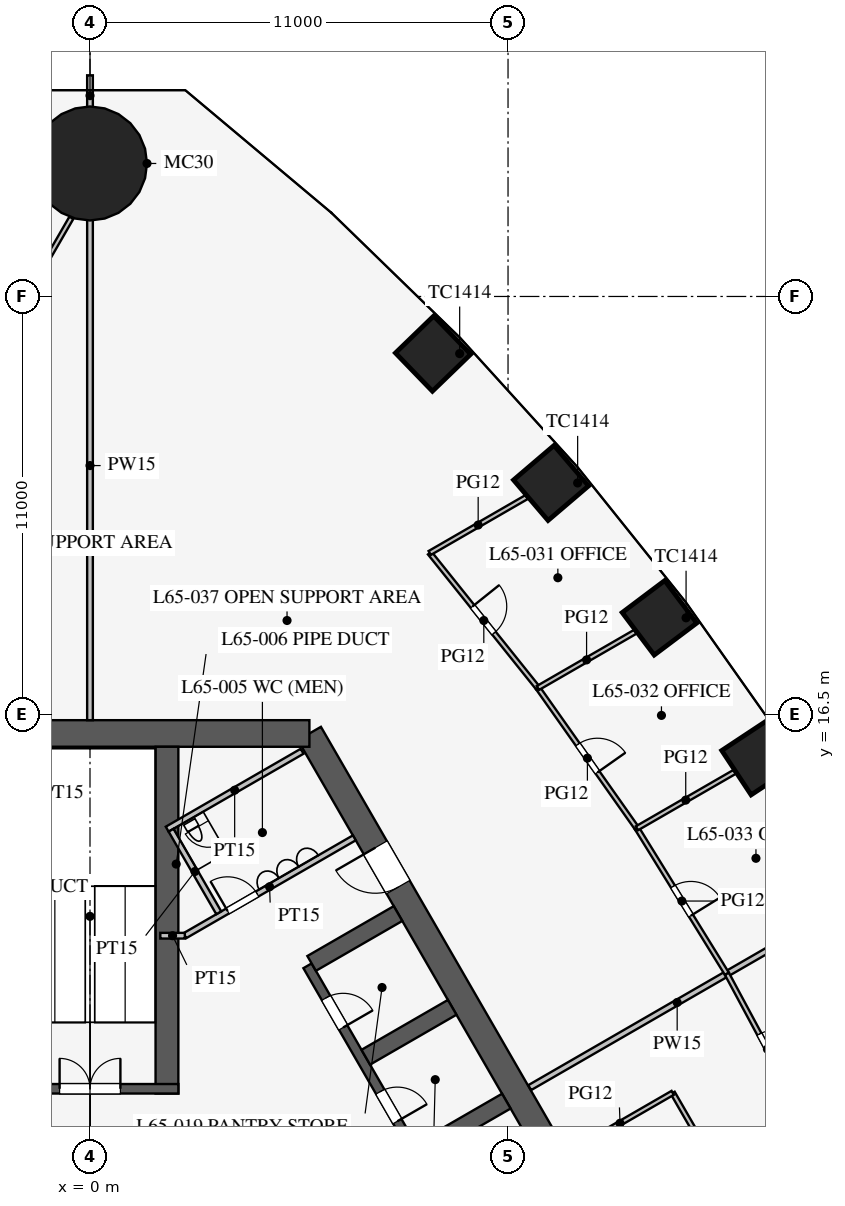
"""IFC4 building model, lengths in metres.
Left out: names, types, materials, properties, quantities, classifications, styles, units other than length and angle.
Written with IfcOpenShell. Run it as: python <this file> out.ifc"""

import sys

from ifc_helpers import new_model, si_unit, direction, frame, frame_2d, origin, origin_2d, place, context, subcontext, project, spatial, rectangle, circle, extrude, element, fill, save


model = new_model("IFC4")
c1 = context("Model", 3, precision=1e-05, world=origin(), true_north=direction((0.0, 1.0)))
c2 = subcontext(c1, "Body", "Model", "MODEL_VIEW")
j1 = project(units=[si_unit("LENGTHUNIT", "METRE"), si_unit("PLANEANGLEUNIT", "RADIAN")], contexts=[c1])
p1 = place(None, origin())
s1 = spatial("IfcSite", under=j1, at=p1, CompositionType="ELEMENT")
p2 = place(p1, origin())
s2 = spatial("IfcBuilding", under=s1, at=p2, CompositionType="ELEMENT")
p3 = place(p2, frame((0.0, 0.0, 284.7)))
s3 = spatial("IfcBuildingStorey", under=s2, at=p3, CompositionType="ELEMENT", Elevation=284.7)
for number, where, z_axis, x_axis in (
    (1, (17.594, 15.354, 0.0), (0.0, 0.0, 1.0), (-0.552, 0.834, 0.0)),
    (2, (14.985, 19.044, 0.0), (0.0, 0.0, 1.0), (-0.601, 0.799, 0.0)),
    (3, (12.132, 22.593, 0.0), (0.0, 0.0, 1.0), (-0.649, 0.761, 0.0)),
    (4, (9.027, 25.997, 0.0), (0.0, 0.0, 1.0), (-0.695, 0.719, 0.0)),
):
    element("IfcColumn", number, at=place(p3, frame(where, z_axis=z_axis, x_axis=x_axis)), inside=s3, PredefinedType="COLUMN", context=c2, shape_type="SweptSolid", body=[
        extrude(rectangle(XDim=1.4, YDim=1.4, at=origin_2d()), origin(), (0.0, 0.0, 1.0), 4.2),
    ])
p4 = place(p3, frame((0.0, 31.0, 0.0), z_axis=(0.0, 0.0, 1.0), x_axis=(1.0, 0.0, 0.0)))
e5 = element("IfcColumn", 5, at=p4, inside=s3, PredefinedType="COLUMN", context=c2, shape_type="SweptSolid", body=[
    extrude(circle(Radius=1.5, at=origin_2d()), origin(), (0.0, 0.0, 1.0), 4.2),
])
p5 = place(p3, frame((16.743, -3.0, 0.0), z_axis=(0.0, 0.0, 1.0), x_axis=(-0.500002442456, 0.866023993627, 0.0)))
e6 = element("IfcWall", 6, at=p5, inside=s3, PredefinedType="SHEAR", context=c2, shape_type="SweptSolid", body=[
    extrude(rectangle(XDim=21.939, YDim=0.7, at=frame_2d((10.97, 0.0))), origin(), (0.0, 0.0, 1.0), 4.2),
])
p6 = place(p5, frame((17.27, 0.0, 0.0)))
e7 = element("IfcOpeningElement", 7, at=p6, cuts=e6, PredefinedType="OPENING", context=c2, shape_type="SweptSolid", body=[
    extrude(rectangle(XDim=1.2, YDim=2.1, at=frame_2d((0.6, 1.05))), frame((0.0, 0.36, 0.0), z_axis=(0.0, -1.0, 0.0), x_axis=(1.0, 0.0, 0.0)), (0.0, 0.0, 1.0), 0.72),
])
p7 = place(p5, frame((3.47, 0.0, 0.0)))
e8 = element("IfcOpeningElement", 8, at=p7, cuts=e6, PredefinedType="OPENING", context=c2, shape_type="SweptSolid", body=[
    extrude(rectangle(XDim=1.2, YDim=2.1, at=frame_2d((0.6, 1.05))), frame((0.0, 0.36, 0.0), z_axis=(0.0, -1.0, 0.0), x_axis=(1.0, 0.0, 0.0)), (0.0, 0.0, 1.0), 0.72),
])
p8 = place(p3, frame((5.773, 16.0, 0.0), z_axis=(0.0, 0.0, 1.0), x_axis=(-1.0, 0.0, 0.0)))
e9 = element("IfcWall", 9, at=p8, inside=s3, PredefinedType="SHEAR", context=c2, shape_type="SweptSolid", body=[
    extrude(rectangle(XDim=11.547, YDim=0.7, at=frame_2d((5.773, 0.0))), origin(), (0.0, 0.0, 1.0), 4.2),
])
p9 = place(p3, frame((11.424, 0.014, 0.0), z_axis=(0.0, 0.0, 1.0), x_axis=(-0.500001763848, 0.866024385424, 0.0)))
e10 = element("IfcWall", 10, at=p9, inside=s3, PredefinedType="SHEAR", context=c2, shape_type="SweptSolid", body=[
    extrude(rectangle(XDim=11.4, YDim=0.25, at=frame_2d((5.7, 0.0))), origin(), (0.0, 0.0, 1.0), 4.2),
])
p10 = place(p9, frame((0.975, 0.0, 0.0)))
e11 = element("IfcOpeningElement", 11, at=p10, cuts=e10, PredefinedType="OPENING", context=c2, shape_type="SweptSolid", body=[
    extrude(rectangle(XDim=0.9, YDim=2.1, at=frame_2d((0.45, 1.05))), frame((0.0, 0.135, 0.0), z_axis=(0.0, -1.0, 0.0), x_axis=(1.0, 0.0, 0.0)), (0.0, 0.0, 1.0), 0.27),
])
p11 = place(p9, frame((3.825, 0.0, 0.0)))
e12 = element("IfcOpeningElement", 12, at=p11, cuts=e10, PredefinedType="OPENING", context=c2, shape_type="SweptSolid", body=[
    extrude(rectangle(XDim=0.9, YDim=2.1, at=frame_2d((0.45, 1.05))), frame((0.0, 0.135, 0.0), z_axis=(0.0, -1.0, 0.0), x_axis=(1.0, 0.0, 0.0)), (0.0, 0.0, 1.0), 0.27),
])
p12 = place(p9, frame((6.675, 0.0, 0.0)))
e13 = element("IfcOpeningElement", 13, at=p12, cuts=e10, PredefinedType="OPENING", context=c2, shape_type="SweptSolid", body=[
    extrude(rectangle(XDim=0.9, YDim=2.1, at=frame_2d((0.45, 1.05))), frame((0.0, 0.135, 0.0), z_axis=(0.0, -1.0, 0.0), x_axis=(1.0, 0.0, 0.0)), (0.0, 0.0, 1.0), 0.27),
])
p13 = place(p9, frame((9.525, 0.0, 0.0)))
e14 = element("IfcOpeningElement", 14, at=p13, cuts=e10, PredefinedType="OPENING", context=c2, shape_type="SweptSolid", body=[
    extrude(rectangle(XDim=0.9, YDim=2.1, at=frame_2d((0.45, 1.05))), frame((0.0, 0.135, 0.0), z_axis=(0.0, -1.0, 0.0), x_axis=(1.0, 0.0, 0.0)), (0.0, 0.0, 1.0), 0.27),
])
for number, where, z_axis, x_axis in (
    (15, (8.682, 5.012, 0.0), (0.0, 0.0, 1.0), (0.866, 0.5, 0.0)),
    (16, (7.257, 7.481, 0.0), (0.0, 0.0, 1.0), (0.866, 0.5, 0.0)),
    (17, (5.832, 9.949, 0.0), (0.0, 0.0, 1.0), (0.866, 0.5, 0.0)),
):
    element("IfcWall", number, at=place(p3, frame(where, z_axis=z_axis, x_axis=x_axis)), inside=s3, PredefinedType="SHEAR", context=c2, shape_type="SweptSolid", body=[
        extrude(rectangle(XDim=2.625, YDim=0.45, at=frame_2d((1.312, 0.0))), origin(), (0.0, 0.0, 1.0), 4.2),
    ])
p14 = place(p3, frame((2.025, 6.525, 0.0), z_axis=(0.0, 0.0, 1.0), x_axis=(0.0, 1.0, 0.0)))
e18 = element("IfcWall", 18, at=p14, inside=s3, PredefinedType="SHEAR", context=c2, shape_type="SweptSolid", body=[
    extrude(rectangle(XDim=9.125, YDim=0.6, at=frame_2d((4.562, 0.0))), origin(), (0.0, 0.0, 1.0), 4.2),
])
p15 = place(p3, frame((2.325, 6.65, 0.0), z_axis=(0.0, 0.0, 1.0), x_axis=(-1.0, 0.0, 0.0)))
e19 = element("IfcWall", 19, at=p15, inside=s3, PredefinedType="SHEAR", context=c2, shape_type="SweptSolid", body=[
    extrude(rectangle(XDim=4.65, YDim=0.25, at=frame_2d((2.325, 0.0))), origin(), (0.0, 0.0, 1.0), 4.2),
])
p16 = place(p15, frame((1.525, 0.0, 0.0)))
e20 = element("IfcOpeningElement", 20, at=p16, cuts=e19, PredefinedType="OPENING", context=c2, shape_type="SweptSolid", body=[
    extrude(rectangle(XDim=1.6, YDim=2.1, at=frame_2d((0.8, 1.05))), frame((0.0, 0.135, 0.0), z_axis=(0.0, -1.0, 0.0), x_axis=(1.0, 0.0, 0.0)), (0.0, 0.0, 1.0), 0.27),
])
p17 = place(p3, frame((2.495, 10.678, 0.0), z_axis=(0.0, 0.0, 1.0), x_axis=(0.866037967349, 0.499978238636, 0.0)))
e21 = element("IfcWall", 21, at=p17, inside=s3, PredefinedType="PARTITIONING", context=c2, shape_type="SweptSolid", body=[
    extrude(rectangle(XDim=5.15, YDim=0.15, at=frame_2d((2.575, 0.0))), origin(), (0.0, 0.0, 1.0), 4.0),
])
p18 = place(p17, frame((1.3, 0.0, 0.0)))
e22 = element("IfcOpeningElement", 22, at=p18, cuts=e21, PredefinedType="OPENING", context=c2, shape_type="SweptSolid", body=[
    extrude(rectangle(XDim=0.9, YDim=2.1, at=frame_2d((0.45, 1.05))), frame((0.0, 0.085, 0.0), z_axis=(0.0, -1.0, 0.0), x_axis=(1.0, 0.0, 0.0)), (0.0, 0.0, 1.0), 0.17),
])
p19 = place(p3, frame((2.495, 10.678, 0.0), z_axis=(0.0, 0.0, 1.0), x_axis=(-1.0, 0.0, 0.0)))
e23 = element("IfcWall", 23, at=p19, inside=s3, PredefinedType="PARTITIONING", context=c2, shape_type="SweptSolid", body=[
    extrude(rectangle(XDim=0.645, YDim=0.15, at=frame_2d((0.323, 0.0))), origin(), (0.0, 0.0, 1.0), 4.0),
])
p20 = place(p3, frame((2.031, 13.482, 0.0), z_axis=(0.0, 0.0, 1.0), x_axis=(0.866050731258, 0.499956128963, 0.0)))
e24 = element("IfcWall", 24, at=p20, inside=s3, PredefinedType="PARTITIONING", context=c2, shape_type="SweptSolid", body=[
    extrude(rectangle(XDim=4.1, YDim=0.15, at=frame_2d((2.05, 0.0))), origin(), (0.0, 0.0, 1.0), 4.0),
])
p21 = place(p3, frame((3.389, 11.281, 0.0), z_axis=(0.0, 0.0, 1.0), x_axis=(-0.499989096993, 0.866031698547, 0.0)))
e25 = element("IfcWall", 25, at=p21, inside=s3, PredefinedType="PARTITIONING", context=c2, shape_type="SweptSolid", body=[
    extrude(rectangle(XDim=2.51, YDim=0.15, at=frame_2d((1.255, 0.0))), origin(), (0.0, 0.0, 1.0), 4.0),
])
p22 = place(p3, frame((0.0, 16.35, 0.0), z_axis=(0.0, 0.0, 1.0), x_axis=(0.0, 1.0, 0.0)))
e26 = element("IfcWall", 26, at=p22, inside=s3, PredefinedType="PARTITIONING", context=c2, shape_type="SweptSolid", body=[
    extrude(rectangle(XDim=13.4, YDim=0.15, at=frame_2d((6.7, 0.0))), origin(), (0.0, 0.0, 1.0), 2.5),
])
p23 = place(p3, frame((0.0, 32.25, 0.0), z_axis=(0.0, 0.0, 1.0), x_axis=(0.0, 1.0, 0.0)))
e27 = element("IfcWall", 27, at=p23, inside=s3, PredefinedType="PARTITIONING", context=c2, shape_type="SweptSolid", body=[
    extrude(rectangle(XDim=1.07, YDim=0.15, at=frame_2d((0.535, 0.0))), origin(), (0.0, 0.0, 1.0), 2.5),
])
p24 = place(p3, frame((11.57, 6.68, 0.0), z_axis=(0.0, 0.0, 1.0), x_axis=(0.866018180823, 0.500012510328, 0.0)))
e28 = element("IfcWall", 28, at=p24, inside=s3, PredefinedType="PARTITIONING", context=c2, shape_type="SweptSolid", body=[
    extrude(rectangle(XDim=8.962, YDim=0.15, at=frame_2d((4.481, 0.0))), origin(), (0.0, 0.0, 1.0), 3.0),
])
p25 = place(p3, frame((17.133, 3.425, 0.0), z_axis=(0.0, 0.0, 1.0), x_axis=(-0.500012057535, 0.866018442252, 0.0)))
e29 = element("IfcWall", 29, at=p25, inside=s3, PredefinedType="PARTITIONING", context=c2, shape_type="SweptSolid", body=[
    extrude(rectangle(XDim=3.6, YDim=0.12, at=frame_2d((1.8, 0.0))), origin(), (0.0, 0.0, 1.0), 2.9),
])
p26 = place(p25, frame((1.3, 0.0, 0.15)))
e30 = element("IfcOpeningElement", 30, at=p26, cuts=e29, PredefinedType="OPENING", context=c2, shape_type="SweptSolid", body=[
    extrude(rectangle(XDim=1.0, YDim=2.1, at=frame_2d((0.5, 1.05))), frame((0.0, 0.07, 0.0), z_axis=(0.0, -1.0, 0.0), x_axis=(1.0, 0.0, 0.0)), (0.0, 0.0, 1.0), 0.14),
])
p27 = place(p3, frame((12.562, 4.943, 0.0), z_axis=(0.0, 0.0, 1.0), x_axis=(0.866008981251, 0.500028443584, 0.0)))
e31 = element("IfcWall", 31, at=p27, inside=s3, PredefinedType="PARTITIONING", context=c2, shape_type="SweptSolid", body=[
    extrude(rectangle(XDim=3.2, YDim=0.12, at=frame_2d((1.6, 0.0))), origin(), (0.0, 0.0, 1.0), 2.9),
])
p28 = place(p3, frame((16.759, 9.676, 0.0), z_axis=(0.0, 0.0, 1.0), x_axis=(-0.525996140194, 0.850486954927, 0.0)))
e32 = element("IfcWall", 32, at=p28, inside=s3, PredefinedType="PARTITIONING", context=c2, shape_type="SweptSolid", body=[
    extrude(rectangle(XDim=4.502, YDim=0.12, at=frame_2d((2.251, 0.0))), origin(), (0.0, 0.0, 1.0), 2.9),
])
p29 = place(p28, frame((1.8, 0.0, 0.15)))
e33 = element("IfcOpeningElement", 33, at=p29, cuts=e32, PredefinedType="OPENING", context=c2, shape_type="SweptSolid", body=[
    extrude(rectangle(XDim=0.9, YDim=2.1, at=frame_2d((0.45, 1.05))), frame((0.0, 0.07, 0.0), z_axis=(0.0, -1.0, 0.0), x_axis=(1.0, 0.0, 0.0)), (0.0, 0.0, 1.0), 0.14),
])
p30 = place(p3, frame((14.391, 13.505, 0.0), z_axis=(0.0, 0.0, 1.0), x_axis=(-0.576562277172, 0.817053205454, 0.0)))
e34 = element("IfcWall", 34, at=p30, inside=s3, PredefinedType="PARTITIONING", context=c2, shape_type="SweptSolid", body=[
    extrude(rectangle(XDim=4.519, YDim=0.12, at=frame_2d((2.259, 0.0))), origin(), (0.0, 0.0, 1.0), 2.9),
])
p31 = place(p30, frame((1.8, 0.0, 0.15)))
e35 = element("IfcOpeningElement", 35, at=p31, cuts=e34, PredefinedType="OPENING", context=c2, shape_type="SweptSolid", body=[
    extrude(rectangle(XDim=0.9, YDim=2.1, at=frame_2d((0.45, 1.05))), frame((0.0, 0.07, 0.0), z_axis=(0.0, -1.0, 0.0), x_axis=(1.0, 0.0, 0.0)), (0.0, 0.0, 1.0), 0.14),
])
p32 = place(p3, frame((11.786, 17.197, 0.0), z_axis=(0.0, 0.0, 1.0), x_axis=(-0.625263875383, 0.780413407202, 0.0)))
e36 = element("IfcWall", 36, at=p32, inside=s3, PredefinedType="PARTITIONING", context=c2, shape_type="SweptSolid", body=[
    extrude(rectangle(XDim=4.552, YDim=0.12, at=frame_2d((2.276, 0.0))), origin(), (0.0, 0.0, 1.0), 2.9),
])
p33 = place(p32, frame((1.85, 0.0, 0.15)))
e37 = element("IfcOpeningElement", 37, at=p33, cuts=e36, PredefinedType="OPENING", context=c2, shape_type="SweptSolid", body=[
    extrude(rectangle(XDim=0.9, YDim=2.1, at=frame_2d((0.45, 1.05))), frame((0.0, 0.07, 0.0), z_axis=(0.0, -1.0, 0.0), x_axis=(1.0, 0.0, 0.0)), (0.0, 0.0, 1.0), 0.14),
])
p34 = place(p3, frame((18.891, 5.71, 0.0), z_axis=(0.0, 0.0, 1.0), x_axis=(-0.473524102582, 0.880780860529, 0.0)))
e38 = element("IfcWall", 38, at=p34, inside=s3, PredefinedType="PARTITIONING", context=c2, shape_type="SweptSolid", body=[
    extrude(rectangle(XDim=4.502, YDim=0.12, at=frame_2d((2.251, 0.0))), origin(), (0.0, 0.0, 1.0), 2.9),
])
p35 = place(p34, frame((1.8, 0.0, 0.15)))
e39 = element("IfcOpeningElement", 39, at=p35, cuts=e38, PredefinedType="OPENING", context=c2, shape_type="SweptSolid", body=[
    extrude(rectangle(XDim=0.9, YDim=2.1, at=frame_2d((0.45, 1.05))), frame((0.0, 0.07, 0.0), z_axis=(0.0, -1.0, 0.0), x_axis=(1.0, 0.0, 0.0)), (0.0, 0.0, 1.0), 0.14),
])
p36 = place(p3, frame((8.939, 20.75, 0.0), z_axis=(0.0, 0.0, 1.0), x_axis=(0.866019881867, 0.500009564119, 0.0)))
e40 = element("IfcWall", 40, at=p36, inside=s3, PredefinedType="PARTITIONING", context=c2, shape_type="SweptSolid", body=[
    extrude(rectangle(XDim=2.944, YDim=0.12, at=frame_2d((1.472, 0.0))), origin(), (0.0, 0.0, 1.0), 2.8),
])
p37 = place(p3, frame((14.391, 13.505, 0.0), z_axis=(0.0, 0.0, 1.0), x_axis=(0.866067759775, 0.499926630096, 0.0)))
e41 = element("IfcWall", 41, at=p37, inside=s3, PredefinedType="PARTITIONING", context=c2, shape_type="SweptSolid", body=[
    extrude(rectangle(XDim=2.967, YDim=0.12, at=frame_2d((1.484, 0.0))), origin(), (0.0, 0.0, 1.0), 2.9),
])
p38 = place(p3, frame((11.786, 17.197, 0.0), z_axis=(0.0, 0.0, 1.0), x_axis=(0.866056430242, 0.499946256749, 0.0)))
e42 = element("IfcWall", 42, at=p38, inside=s3, PredefinedType="PARTITIONING", context=c2, shape_type="SweptSolid", body=[
    extrude(rectangle(XDim=2.959, YDim=0.12, at=frame_2d((1.479, 0.0))), origin(), (0.0, 0.0, 1.0), 2.9),
])
p39 = place(p3, frame((-0.49, 29.571, 0.0), z_axis=(0.0, 0.0, 1.0), x_axis=(-0.499999496503, -0.866025694478, 0.0)))
e43 = element("IfcWall", 43, at=p39, inside=s3, PredefinedType="PARTITIONING", context=c2, shape_type="SweptSolid", body=[
    extrude(rectangle(XDim=50.728, YDim=0.12, at=frame_2d((25.364, 0.0))), origin(), (0.0, 0.0, 1.0), 2.9),
])
p40 = place(p39, frame((9.8, 0.0, 0.15)))
e44 = element("IfcOpeningElement", 44, at=p40, cuts=e43, PredefinedType="OPENING", context=c2, shape_type="SweptSolid", body=[
    extrude(rectangle(XDim=1.8, YDim=2.1, at=frame_2d((0.9, 1.05))), frame((0.0, 0.07, 0.0), z_axis=(0.0, -1.0, 0.0), x_axis=(1.0, 0.0, 0.0)), (0.0, 0.0, 1.0), 0.14),
])
p41 = place(p39, frame((39.15, 0.0, 0.15)))
e45 = element("IfcOpeningElement", 45, at=p41, cuts=e43, PredefinedType="OPENING", context=c2, shape_type="SweptSolid", body=[
    extrude(rectangle(XDim=1.8, YDim=2.1, at=frame_2d((0.9, 1.05))), frame((0.0, 0.07, 0.0), z_axis=(0.0, -1.0, 0.0), x_axis=(1.0, 0.0, 0.0)), (0.0, 0.0, 1.0), 0.14),
])
p42 = place(p18, origin())
e46 = element("IfcDoor", 46, at=p42, inside=s3, OperationType="SINGLE_SWING_LEFT", PredefinedType="DOOR", context=c2, shape_type="SweptSolid", body=[
    extrude(rectangle(XDim=0.9, YDim=2.1, at=frame_2d((0.45, 1.05))), frame((0.0, 0.025, 0.0), z_axis=(0.0, -1.0, 0.0), x_axis=(1.0, 0.0, 0.0)), (0.0, 0.0, 1.0), 0.05),
])
fill(e22, e46)
p43 = place(p16, frame((1.6, 0.0, 0.0), z_axis=(0.0, 0.0, 1.0), x_axis=(-1.0, 0.0, 0.0)))
e47 = element("IfcDoor", 47, at=p43, inside=s3, OperationType="DOUBLE_DOOR_SINGLE_SWING", PredefinedType="DOOR", context=c2, shape_type="SweptSolid", body=[
    extrude(rectangle(XDim=1.6, YDim=2.1, at=frame_2d((0.8, 1.05))), frame((0.0, 0.025, 0.0), z_axis=(0.0, -1.0, 0.0), x_axis=(1.0, 0.0, 0.0)), (0.0, 0.0, 1.0), 0.05),
])
fill(e20, e47)
p44 = place(p6, origin())
e48 = element("IfcDoor", 48, at=p44, inside=s3, OperationType="SINGLE_SWING_RIGHT", PredefinedType="DOOR", context=c2, shape_type="SweptSolid", body=[
    extrude(rectangle(XDim=1.2, YDim=2.1, at=frame_2d((0.6, 1.05))), frame((0.0, 0.025, 0.0), z_axis=(0.0, -1.0, 0.0), x_axis=(1.0, 0.0, 0.0)), (0.0, 0.0, 1.0), 0.05),
])
fill(e7, e48)
p45 = place(p12, frame((0.9, 0.0, 0.0), z_axis=(0.0, 0.0, 1.0), x_axis=(-1.0, 0.0, 0.0)))
e49 = element("IfcDoor", 49, at=p45, inside=s3, OperationType="SINGLE_SWING_RIGHT", PredefinedType="DOOR", context=c2, shape_type="SweptSolid", body=[
    extrude(rectangle(XDim=0.9, YDim=2.1, at=frame_2d((0.45, 1.05))), frame((0.0, 0.025, 0.0), z_axis=(0.0, -1.0, 0.0), x_axis=(1.0, 0.0, 0.0)), (0.0, 0.0, 1.0), 0.05),
])
fill(e13, e49)
p46 = place(p13, frame((0.9, 0.0, 0.0), z_axis=(0.0, 0.0, 1.0), x_axis=(-1.0, 0.0, 0.0)))
e50 = element("IfcDoor", 50, at=p46, inside=s3, OperationType="SINGLE_SWING_RIGHT", PredefinedType="DOOR", context=c2, shape_type="SweptSolid", body=[
    extrude(rectangle(XDim=0.9, YDim=2.1, at=frame_2d((0.45, 1.05))), frame((0.0, 0.025, 0.0), z_axis=(0.0, -1.0, 0.0), x_axis=(1.0, 0.0, 0.0)), (0.0, 0.0, 1.0), 0.05),
])
fill(e14, e50)
p47 = place(p33, frame((0.9, 0.0, 0.0), z_axis=(0.0, 0.0, 1.0), x_axis=(-1.0, 0.0, 0.0)))
e51 = element("IfcDoor", 51, at=p47, inside=s3, OperationType="SINGLE_SWING_LEFT", PredefinedType="DOOR", context=c2, shape_type="SweptSolid", body=[
    extrude(rectangle(XDim=0.9, YDim=2.1, at=frame_2d((0.45, 1.05))), frame((0.0, 0.025, 0.0), z_axis=(0.0, -1.0, 0.0), x_axis=(1.0, 0.0, 0.0)), (0.0, 0.0, 1.0), 0.05),
])
fill(e37, e51)
p48 = place(p31, frame((0.9, 0.0, 0.0), z_axis=(0.0, 0.0, 1.0), x_axis=(-1.0, 0.0, 0.0)))
e52 = element("IfcDoor", 52, at=p48, inside=s3, OperationType="SINGLE_SWING_RIGHT", PredefinedType="DOOR", context=c2, shape_type="SweptSolid", body=[
    extrude(rectangle(XDim=0.9, YDim=2.1, at=frame_2d((0.45, 1.05))), frame((0.0, 0.025, 0.0), z_axis=(0.0, -1.0, 0.0), x_axis=(1.0, 0.0, 0.0)), (0.0, 0.0, 1.0), 0.05),
])
fill(e35, e52)
p49 = place(p29, frame((0.9, 0.0, 0.0), z_axis=(0.0, 0.0, 1.0), x_axis=(-1.0, 0.0, 0.0)))
e53 = element("IfcDoor", 53, at=p49, inside=s3, OperationType="SINGLE_SWING_RIGHT", PredefinedType="DOOR", context=c2, shape_type="SweptSolid", body=[
    extrude(rectangle(XDim=0.9, YDim=2.1, at=frame_2d((0.45, 1.05))), frame((0.0, 0.025, 0.0), z_axis=(0.0, -1.0, 0.0), x_axis=(1.0, 0.0, 0.0)), (0.0, 0.0, 1.0), 0.05),
])
fill(e33, e53)
p50 = place(p35, frame((0.9, 0.0, 0.0), z_axis=(0.0, 0.0, 1.0), x_axis=(-1.0, 0.0, 0.0)))
e54 = element("IfcDoor", 54, at=p50, inside=s3, OperationType="SINGLE_SWING_RIGHT", PredefinedType="DOOR", context=c2, shape_type="SweptSolid", body=[
    extrude(rectangle(XDim=0.9, YDim=2.1, at=frame_2d((0.45, 1.05))), frame((0.0, 0.025, 0.0), z_axis=(0.0, -1.0, 0.0), x_axis=(1.0, 0.0, 0.0)), (0.0, 0.0, 1.0), 0.05),
])
fill(e39, e54)
save(model, sys.argv[1])
